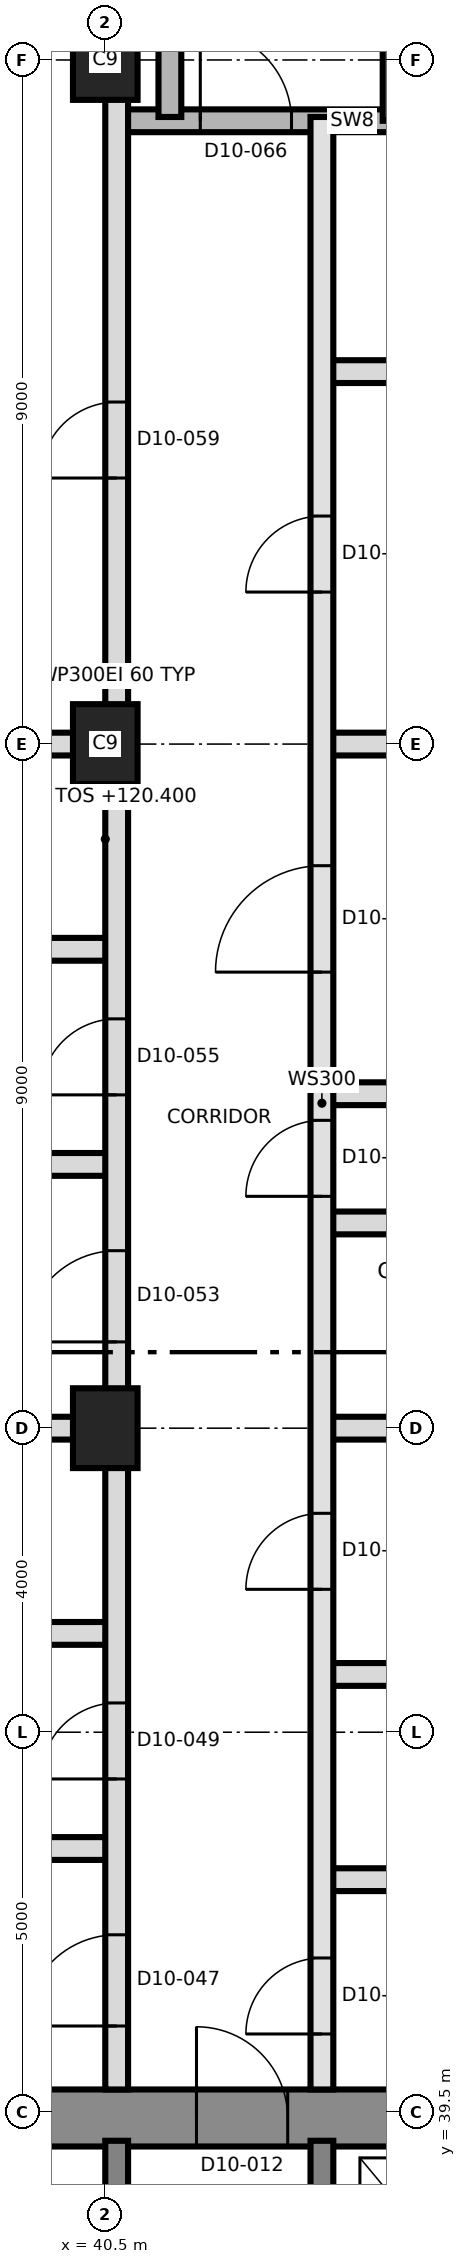
"""IFC4 building model, lengths in metres.
Left out: names, types, materials, properties, quantities, classifications, styles, units other than length and angle.
Written with IfcOpenShell. Run it as: python <this file> out.ifc"""

import sys

from ifc_helpers import new_model, si_unit, direction, frame, frame_2d, origin, origin_2d, place, context, subcontext, project, spatial, rectangle, extrude, element, fill, save


model = new_model("IFC4")
c1 = context("Model", 3, precision=1e-05, world=origin(), true_north=direction((0.0, 1.0)))
c2 = subcontext(c1, "Body", "Model", "MODEL_VIEW")
j1 = project(units=[si_unit("LENGTHUNIT", "METRE"), si_unit("PLANEANGLEUNIT", "RADIAN")], contexts=[c1])
p1 = place(None, origin())
s1 = spatial("IfcSite", under=j1, at=p1, CompositionType="ELEMENT")
p2 = place(p1, origin())
s2 = spatial("IfcBuilding", under=s1, at=p2, CompositionType="ELEMENT")
p3 = place(p2, frame((0.0, 0.0, 120.4)))
s3 = spatial("IfcBuildingStorey", under=s2, at=p3, CompositionType="ELEMENT", Elevation=120.4)
p4 = place(p3, frame((31.125, 39.425, 0.0), z_axis=(0.0, 0.0, 1.0), x_axis=(1.0, 0.0, 0.0)))
e1 = element("IfcWall", 1, at=p4, inside=s3, PredefinedType="SHEAR", context=c2, shape_type="SweptSolid", body=[
    extrude(rectangle(XDim=27.0, YDim=0.75, at=frame_2d((13.5, 0.0))), origin(), (0.0, 0.0, 1.0), 3.7),
])
p5 = place(p4, frame((10.575, 0.0, 0.0)))
e2 = element("IfcOpeningElement", 2, at=p5, cuts=e1, PredefinedType="OPENING", context=c2, shape_type="SweptSolid", body=[
    extrude(rectangle(XDim=1.2, YDim=2.1, at=frame_2d((0.6, 1.05))), frame((0.0, 0.385, 0.0), z_axis=(0.0, -1.0, 0.0), x_axis=(1.0, 0.0, 0.0)), (0.0, 0.0, 1.0), 0.77),
])
for number, where, z_axis, x_axis in (
    (3, (40.65, 33.5, 0.0), (0.0, 0.0, 1.0), (0.0, 1.0, 0.0)),
    (4, (43.35, 33.5, 0.0), (0.0, 0.0, 1.0), (0.0, 1.0, 0.0)),
):
    element("IfcWall", number, at=place(p3, frame(where, z_axis=z_axis, x_axis=x_axis)), inside=s3, PredefinedType="SHEAR", context=c2, shape_type="SweptSolid", body=[
        extrude(rectangle(XDim=5.625, YDim=0.3, at=frame_2d((2.812, 0.0))), origin(), (0.0, 0.0, 1.0), 3.7),
    ])
for number, where, z_axis, x_axis in (
    (5, (40.5, 48.5, 0.0), (0.0, 0.0, 1.0), (0.0, 1.0, 0.0)),
    (6, (40.5, 57.5, 0.0), (0.0, 0.0, 1.0), (0.0, 1.0, 0.0)),
    (7, (40.5, 66.5, 0.0), (0.0, 0.0, 1.0), (0.0, 1.0, 0.0)),
):
    element("IfcColumn", number, at=place(p3, frame(where, z_axis=z_axis, x_axis=x_axis)), inside=s3, PredefinedType="COLUMN", context=c2, shape_type="SweptSolid", body=[
        extrude(rectangle(XDim=1.05, YDim=0.85, at=origin_2d()), origin(), (0.0, 0.0, 1.0), 3.7),
    ])
p6 = place(p3, frame((43.35, 42.56, 0.0), z_axis=(0.0, 0.0, 1.0), x_axis=(1.0, 0.0, 0.0)))
e8 = element("IfcWall", 8, at=p6, inside=s3, PredefinedType="PARTITIONING", context=c2, shape_type="SweptSolid", body=[
    extrude(rectangle(XDim=3.2, YDim=0.3, at=frame_2d((1.6, 0.0))), origin(), (0.0, 0.0, 1.0), 3.4),
])
p7 = place(p3, frame((29.275, 42.97, 0.0), z_axis=(0.0, 0.0, 1.0), x_axis=(1.0, 0.0, 0.0)))
e9 = element("IfcWall", 9, at=p7, inside=s3, PredefinedType="PARTITIONING", context=c2, shape_type="SweptSolid", body=[
    extrude(rectangle(XDim=11.375, YDim=0.3, at=frame_2d((5.688, 0.0))), origin(), (0.0, 0.0, 1.0), 3.35),
])
p8 = place(p3, frame((43.35, 45.26, 0.0), z_axis=(0.0, 0.0, 1.0), x_axis=(1.0, 0.0, 0.0)))
e10 = element("IfcWall", 10, at=p8, inside=s3, PredefinedType="PARTITIONING", context=c2, shape_type="SweptSolid", body=[
    extrude(rectangle(XDim=8.676, YDim=0.3, at=frame_2d((4.338, 0.0))), origin(), (0.0, 0.0, 1.0), 3.35),
])
p9 = place(p3, frame((37.45, 45.8, 0.0), z_axis=(0.0, 0.0, 1.0), x_axis=(1.0, 0.0, 0.0)))
e11 = element("IfcWall", 11, at=p9, inside=s3, PredefinedType="PARTITIONING", context=c2, shape_type="SweptSolid", body=[
    extrude(rectangle(XDim=3.2, YDim=0.3, at=frame_2d((1.6, 0.0))), origin(), (0.0, 0.0, 1.0), 3.4),
])
p10 = place(p3, frame((29.275, 48.5, 0.0), z_axis=(0.0, 0.0, 1.0), x_axis=(1.0, 0.0, 0.0)))
e12 = element("IfcWall", 12, at=p10, inside=s3, PredefinedType="PARTITIONING", context=c2, shape_type="SweptSolid", body=[
    extrude(rectangle(XDim=11.375, YDim=0.3, at=frame_2d((5.688, 0.0))), origin(), (0.0, 0.0, 1.0), 3.35),
])
p11 = place(p3, frame((43.35, 48.5, 0.0), z_axis=(0.0, 0.0, 1.0), x_axis=(1.0, 0.0, 0.0)))
e13 = element("IfcWall", 13, at=p11, inside=s3, PredefinedType="PARTITIONING", context=c2, shape_type="SweptSolid", body=[
    extrude(rectangle(XDim=8.555, YDim=0.3, at=frame_2d((4.277, 0.0))), origin(), (0.0, 0.0, 1.0), 3.35),
])
p12 = place(p3, frame((43.35, 51.2, 0.0), z_axis=(0.0, 0.0, 1.0), x_axis=(1.0, 0.0, 0.0)))
e14 = element("IfcWall", 14, at=p12, inside=s3, PredefinedType="PARTITIONING", context=c2, shape_type="SweptSolid", body=[
    extrude(rectangle(XDim=3.2, YDim=0.3, at=frame_2d((1.6, 0.0))), origin(), (0.0, 0.0, 1.0), 3.4),
])
p13 = place(p3, frame((29.275, 51.97, 0.0), z_axis=(0.0, 0.0, 1.0), x_axis=(1.0, 0.0, 0.0)))
e15 = element("IfcWall", 15, at=p13, inside=s3, PredefinedType="PARTITIONING", context=c2, shape_type="SweptSolid", body=[
    extrude(rectangle(XDim=11.375, YDim=0.3, at=frame_2d((5.688, 0.0))), origin(), (0.0, 0.0, 1.0), 3.35),
])
p14 = place(p3, frame((43.35, 52.9, 0.0), z_axis=(0.0, 0.0, 1.0), x_axis=(1.0, 0.0, 0.0)))
e16 = element("IfcWall", 16, at=p14, inside=s3, PredefinedType="PARTITIONING", context=c2, shape_type="SweptSolid", body=[
    extrude(rectangle(XDim=8.555, YDim=0.3, at=frame_2d((4.277, 0.0))), origin(), (0.0, 0.0, 1.0), 3.35),
])
p15 = place(p3, frame((37.45, 54.8, 0.0), z_axis=(0.0, 0.0, 1.0), x_axis=(1.0, 0.0, 0.0)))
e17 = element("IfcWall", 17, at=p15, inside=s3, PredefinedType="PARTITIONING", context=c2, shape_type="SweptSolid", body=[
    extrude(rectangle(XDim=3.2, YDim=0.3, at=frame_2d((1.6, 0.0))), origin(), (0.0, 0.0, 1.0), 3.4),
])
p16 = place(p3, frame((29.275, 57.5, 0.0), z_axis=(0.0, 0.0, 1.0), x_axis=(1.0, 0.0, 0.0)))
e18 = element("IfcWall", 18, at=p16, inside=s3, PredefinedType="PARTITIONING", context=c2, shape_type="SweptSolid", body=[
    extrude(rectangle(XDim=11.375, YDim=0.3, at=frame_2d((5.688, 0.0))), origin(), (0.0, 0.0, 1.0), 3.35),
])
p17 = place(p3, frame((43.35, 57.5, 0.0), z_axis=(0.0, 0.0, 1.0), x_axis=(1.0, 0.0, 0.0)))
e19 = element("IfcWall", 19, at=p17, inside=s3, PredefinedType="PARTITIONING", context=c2, shape_type="SweptSolid", body=[
    extrude(rectangle(XDim=8.555, YDim=0.3, at=frame_2d((4.277, 0.0))), origin(), (0.0, 0.0, 1.0), 3.35),
])
p18 = place(p3, frame((43.35, 62.4, 0.0), z_axis=(0.0, 0.0, 1.0), x_axis=(1.0, 0.0, 0.0)))
e20 = element("IfcWall", 20, at=p18, inside=s3, PredefinedType="PARTITIONING", context=c2, shape_type="SweptSolid", body=[
    extrude(rectangle(XDim=8.555, YDim=0.3, at=frame_2d((4.277, 0.0))), origin(), (0.0, 0.0, 1.0), 3.35),
])
p19 = place(p18, frame((4.65, 0.0, 0.0)))
e21 = element("IfcOpeningElement", 21, at=p19, cuts=e20, PredefinedType="OPENING", context=c2, shape_type="SweptSolid", body=[
    extrude(rectangle(XDim=1.0, YDim=2.1, at=frame_2d((0.5, 1.05))), frame((0.0, 0.16, 0.0), z_axis=(0.0, -1.0, 0.0), x_axis=(1.0, 0.0, 0.0)), (0.0, 0.0, 1.0), 0.32),
])
p20 = place(p3, frame((40.65, 65.7, 0.0), z_axis=(0.0, 0.0, 1.0), x_axis=(1.0, 0.0, 0.0)))
e22 = element("IfcWall", 22, at=p20, inside=s3, PredefinedType="SHEAR", context=c2, shape_type="SweptSolid", body=[
    extrude(rectangle(XDim=6.2, YDim=0.3, at=frame_2d((3.1, 0.0))), origin(), (0.0, 0.0, 1.0), 3.4),
])
p21 = place(p20, frame((1.1, 0.0, 0.0)))
e23 = element("IfcOpeningElement", 23, at=p21, cuts=e22, PredefinedType="OPENING", context=c2, shape_type="SweptSolid", body=[
    extrude(rectangle(XDim=1.2, YDim=2.1, at=frame_2d((0.6, 1.05))), frame((0.0, 0.16, 0.0), z_axis=(0.0, -1.0, 0.0), x_axis=(1.0, 0.0, 0.0)), (0.0, 0.0, 1.0), 0.32),
])
p22 = place(p3, frame((40.65, 39.8, 0.0), z_axis=(0.0, 0.0, 1.0), x_axis=(0.0, 1.0, 0.0)))
e24 = element("IfcWall", 24, at=p22, inside=s3, PredefinedType="PARTITIONING", context=c2, shape_type="SweptSolid", body=[
    extrude(rectangle(XDim=37.2, YDim=0.3, at=frame_2d((18.6, 0.0))), origin(), (0.0, 0.0, 1.0), 3.35),
])
p23 = place(p22, frame((0.835, 0.0, 0.0)))
e25 = element("IfcOpeningElement", 25, at=p23, cuts=e24, PredefinedType="OPENING", context=c2, shape_type="SweptSolid", body=[
    extrude(rectangle(XDim=1.2, YDim=2.1, at=frame_2d((0.6, 1.05))), frame((0.0, 0.16, 0.0), z_axis=(0.0, -1.0, 0.0), x_axis=(1.0, 0.0, 0.0)), (0.0, 0.0, 1.0), 0.32),
])
p24 = place(p22, frame((4.085, 0.0, 0.0)))
e26 = element("IfcOpeningElement", 26, at=p24, cuts=e24, PredefinedType="OPENING", context=c2, shape_type="SweptSolid", body=[
    extrude(rectangle(XDim=1.0, YDim=2.1, at=frame_2d((0.5, 1.05))), frame((0.0, 0.16, 0.0), z_axis=(0.0, -1.0, 0.0), x_axis=(1.0, 0.0, 0.0)), (0.0, 0.0, 1.0), 0.32),
])
p25 = place(p22, frame((9.835, 0.0, 0.0)))
e27 = element("IfcOpeningElement", 27, at=p25, cuts=e24, PredefinedType="OPENING", context=c2, shape_type="SweptSolid", body=[
    extrude(rectangle(XDim=1.2, YDim=2.1, at=frame_2d((0.6, 1.05))), frame((0.0, 0.16, 0.0), z_axis=(0.0, -1.0, 0.0), x_axis=(1.0, 0.0, 0.0)), (0.0, 0.0, 1.0), 0.32),
])
p26 = place(p22, frame((13.085, 0.0, 0.0)))
e28 = element("IfcOpeningElement", 28, at=p26, cuts=e24, PredefinedType="OPENING", context=c2, shape_type="SweptSolid", body=[
    extrude(rectangle(XDim=1.0, YDim=2.1, at=frame_2d((0.5, 1.05))), frame((0.0, 0.16, 0.0), z_axis=(0.0, -1.0, 0.0), x_axis=(1.0, 0.0, 0.0)), (0.0, 0.0, 1.0), 0.32),
])
p27 = place(p22, frame((21.2, 0.0, 0.0)))
e29 = element("IfcOpeningElement", 29, at=p27, cuts=e24, PredefinedType="OPENING", context=c2, shape_type="SweptSolid", body=[
    extrude(rectangle(XDim=1.0, YDim=2.4, at=frame_2d((0.5, 1.2))), frame((0.0, 0.16, 0.0), z_axis=(0.0, -1.0, 0.0), x_axis=(1.0, 0.0, 0.0)), (0.0, 0.0, 1.0), 0.32),
])
p28 = place(p3, frame((41.35, 65.75, 0.0), z_axis=(0.0, 0.0, 1.0), x_axis=(0.0, 1.0, 0.0)))
e30 = element("IfcWall", 30, at=p28, inside=s3, PredefinedType="SHEAR", context=c2, shape_type="SweptSolid", body=[
    extrude(rectangle(XDim=8.85, YDim=0.3, at=frame_2d((4.425, 0.0))), origin(), (0.0, 0.0, 1.0), 3.4),
])
p29 = place(p3, frame((43.35, 39.8, 0.0), z_axis=(0.0, 0.0, 1.0), x_axis=(0.0, 1.0, 0.0)))
e31 = element("IfcWall", 31, at=p29, inside=s3, PredefinedType="SOLIDWALL", context=c2, shape_type="SweptSolid", body=[
    extrude(rectangle(XDim=25.95, YDim=0.3, at=frame_2d((12.975, 0.0))), origin(), (0.0, 0.0, 1.0), 3.4),
])
p30 = place(p29, frame((0.73, 0.0, 0.0)))
e32 = element("IfcOpeningElement", 32, at=p30, cuts=e31, PredefinedType="OPENING", context=c2, shape_type="SweptSolid", body=[
    extrude(rectangle(XDim=1.0, YDim=2.1, at=frame_2d((0.5, 1.05))), frame((0.0, 0.16, 0.0), z_axis=(0.0, -1.0, 0.0), x_axis=(1.0, 0.0, 0.0)), (0.0, 0.0, 1.0), 0.32),
])
p31 = place(p29, frame((6.58, 0.0, 0.0)))
e33 = element("IfcOpeningElement", 33, at=p31, cuts=e31, PredefinedType="OPENING", context=c2, shape_type="SweptSolid", body=[
    extrude(rectangle(XDim=1.0, YDim=2.1, at=frame_2d((0.5, 1.05))), frame((0.0, 0.16, 0.0), z_axis=(0.0, -1.0, 0.0), x_axis=(1.0, 0.0, 0.0)), (0.0, 0.0, 1.0), 0.32),
])
p32 = place(p29, frame((11.75, 0.0, 0.0)))
e34 = element("IfcOpeningElement", 34, at=p32, cuts=e31, PredefinedType="OPENING", context=c2, shape_type="SweptSolid", body=[
    extrude(rectangle(XDim=1.0, YDim=2.1, at=frame_2d((0.5, 1.05))), frame((0.0, 0.16, 0.0), z_axis=(0.0, -1.0, 0.0), x_axis=(1.0, 0.0, 0.0)), (0.0, 0.0, 1.0), 0.32),
])
p33 = place(p29, frame((14.7, 0.0, 0.0)))
e35 = element("IfcOpeningElement", 35, at=p33, cuts=e31, PredefinedType="OPENING", context=c2, shape_type="SweptSolid", body=[
    extrude(rectangle(XDim=1.4, YDim=2.1, at=frame_2d((0.7, 1.05))), frame((0.0, 0.16, 0.0), z_axis=(0.0, -1.0, 0.0), x_axis=(1.0, 0.0, 0.0)), (0.0, 0.0, 1.0), 0.32),
])
p34 = place(p29, frame((19.7, 0.0, 0.0)))
e36 = element("IfcOpeningElement", 36, at=p34, cuts=e31, PredefinedType="OPENING", context=c2, shape_type="SweptSolid", body=[
    extrude(rectangle(XDim=1.0, YDim=2.4, at=frame_2d((0.5, 1.2))), frame((0.0, 0.16, 0.0), z_axis=(0.0, -1.0, 0.0), x_axis=(1.0, 0.0, 0.0)), (0.0, 0.0, 1.0), 0.32),
])
p35 = place(p3, frame((44.3, 65.7, 0.0), z_axis=(0.0, 0.0, 1.0), x_axis=(0.0, 1.0, 0.0)))
e37 = element("IfcWall", 37, at=p35, inside=s3, PredefinedType="SHEAR", context=c2, shape_type="SweptSolid", body=[
    extrude(rectangle(XDim=8.9, YDim=0.3, at=frame_2d((4.45, 0.0))), origin(), (0.0, 0.0, 1.0), 3.4),
])
p36 = place(p5, origin())
e38 = element("IfcDoor", 38, at=p36, inside=s3, OperationType="SINGLE_SWING_RIGHT", PredefinedType="DOOR", context=c2, shape_type="SweptSolid", body=[
    extrude(rectangle(XDim=1.2, YDim=2.1, at=frame_2d((0.6, 1.05))), frame((0.0, 0.025, 0.0), z_axis=(0.0, -1.0, 0.0), x_axis=(1.0, 0.0, 0.0)), (0.0, 0.0, 1.0), 0.05),
])
fill(e2, e38)
p37 = place(p30, origin())
e39 = element("IfcDoor", 39, at=p37, inside=s3, OperationType="SINGLE_SWING_LEFT", PredefinedType="DOOR", context=c2, shape_type="SweptSolid", body=[
    extrude(rectangle(XDim=1.0, YDim=2.1, at=frame_2d((0.5, 1.05))), frame((0.0, 0.025, 0.0), z_axis=(0.0, -1.0, 0.0), x_axis=(1.0, 0.0, 0.0)), (0.0, 0.0, 1.0), 0.05),
])
fill(e32, e39)
p38 = place(p31, origin())
e40 = element("IfcDoor", 40, at=p38, inside=s3, OperationType="SINGLE_SWING_RIGHT", PredefinedType="DOOR", context=c2, shape_type="SweptSolid", body=[
    extrude(rectangle(XDim=1.0, YDim=2.1, at=frame_2d((0.5, 1.05))), frame((0.0, 0.025, 0.0), z_axis=(0.0, -1.0, 0.0), x_axis=(1.0, 0.0, 0.0)), (0.0, 0.0, 1.0), 0.05),
])
fill(e33, e40)
p39 = place(p23, origin())
e41 = element("IfcDoor", 41, at=p39, inside=s3, OperationType="SINGLE_SWING_LEFT", PredefinedType="DOOR", context=c2, shape_type="SweptSolid", body=[
    extrude(rectangle(XDim=1.2, YDim=2.1, at=frame_2d((0.6, 1.05))), frame((0.0, 0.025, 0.0), z_axis=(0.0, -1.0, 0.0), x_axis=(1.0, 0.0, 0.0)), (0.0, 0.0, 1.0), 0.05),
])
fill(e25, e41)
p40 = place(p24, origin())
e42 = element("IfcDoor", 42, at=p40, inside=s3, OperationType="SINGLE_SWING_LEFT", PredefinedType="DOOR", context=c2, shape_type="SweptSolid", body=[
    extrude(rectangle(XDim=1.0, YDim=2.1, at=frame_2d((0.5, 1.05))), frame((0.0, 0.025, 0.0), z_axis=(0.0, -1.0, 0.0), x_axis=(1.0, 0.0, 0.0)), (0.0, 0.0, 1.0), 0.05),
])
fill(e26, e42)
p41 = place(p32, origin())
e43 = element("IfcDoor", 43, at=p41, inside=s3, OperationType="SINGLE_SWING_LEFT", PredefinedType="DOOR", context=c2, shape_type="SweptSolid", body=[
    extrude(rectangle(XDim=1.0, YDim=2.1, at=frame_2d((0.5, 1.05))), frame((0.0, 0.025, 0.0), z_axis=(0.0, -1.0, 0.0), x_axis=(1.0, 0.0, 0.0)), (0.0, 0.0, 1.0), 0.05),
])
fill(e34, e43)
p42 = place(p33, origin())
e44 = element("IfcDoor", 44, at=p42, inside=s3, OperationType="SINGLE_SWING_RIGHT", PredefinedType="DOOR", context=c2, shape_type="SweptSolid", body=[
    extrude(rectangle(XDim=1.4, YDim=2.1, at=frame_2d((0.7, 1.05))), frame((0.0, 0.025, 0.0), z_axis=(0.0, -1.0, 0.0), x_axis=(1.0, 0.0, 0.0)), (0.0, 0.0, 1.0), 0.05),
])
fill(e35, e44)
p43 = place(p25, origin())
e45 = element("IfcDoor", 45, at=p43, inside=s3, OperationType="SINGLE_SWING_LEFT", PredefinedType="DOOR", context=c2, shape_type="SweptSolid", body=[
    extrude(rectangle(XDim=1.2, YDim=2.1, at=frame_2d((0.6, 1.05))), frame((0.0, 0.025, 0.0), z_axis=(0.0, -1.0, 0.0), x_axis=(1.0, 0.0, 0.0)), (0.0, 0.0, 1.0), 0.05),
])
fill(e27, e45)
p44 = place(p26, origin())
e46 = element("IfcDoor", 46, at=p44, inside=s3, OperationType="SINGLE_SWING_LEFT", PredefinedType="DOOR", context=c2, shape_type="SweptSolid", body=[
    extrude(rectangle(XDim=1.0, YDim=2.1, at=frame_2d((0.5, 1.05))), frame((0.0, 0.025, 0.0), z_axis=(0.0, -1.0, 0.0), x_axis=(1.0, 0.0, 0.0)), (0.0, 0.0, 1.0), 0.05),
])
fill(e28, e46)
p45 = place(p34, origin())
e47 = element("IfcDoor", 47, at=p45, inside=s3, OperationType="SINGLE_SWING_LEFT", PredefinedType="DOOR", context=c2, shape_type="SweptSolid", body=[
    extrude(rectangle(XDim=1.0, YDim=2.4, at=frame_2d((0.5, 1.2))), frame((0.0, 0.025, 0.0), z_axis=(0.0, -1.0, 0.0), x_axis=(1.0, 0.0, 0.0)), (0.0, 0.0, 1.0), 0.05),
])
fill(e36, e47)
p46 = place(p27, origin())
e48 = element("IfcDoor", 48, at=p46, inside=s3, OperationType="SINGLE_SWING_LEFT", PredefinedType="DOOR", context=c2, shape_type="SweptSolid", body=[
    extrude(rectangle(XDim=1.0, YDim=2.4, at=frame_2d((0.5, 1.2))), frame((0.0, 0.025, 0.0), z_axis=(0.0, -1.0, 0.0), x_axis=(1.0, 0.0, 0.0)), (0.0, 0.0, 1.0), 0.05),
])
fill(e29, e48)
p47 = place(p21, origin())
e49 = element("IfcDoor", 49, at=p47, inside=s3, OperationType="SINGLE_SWING_RIGHT", PredefinedType="DOOR", context=c2, shape_type="SweptSolid", body=[
    extrude(rectangle(XDim=1.2, YDim=2.1, at=frame_2d((0.6, 1.05))), frame((0.0, 0.025, 0.0), z_axis=(0.0, -1.0, 0.0), x_axis=(1.0, 0.0, 0.0)), (0.0, 0.0, 1.0), 0.05),
])
fill(e23, e49)
save(model, sys.argv[1])
